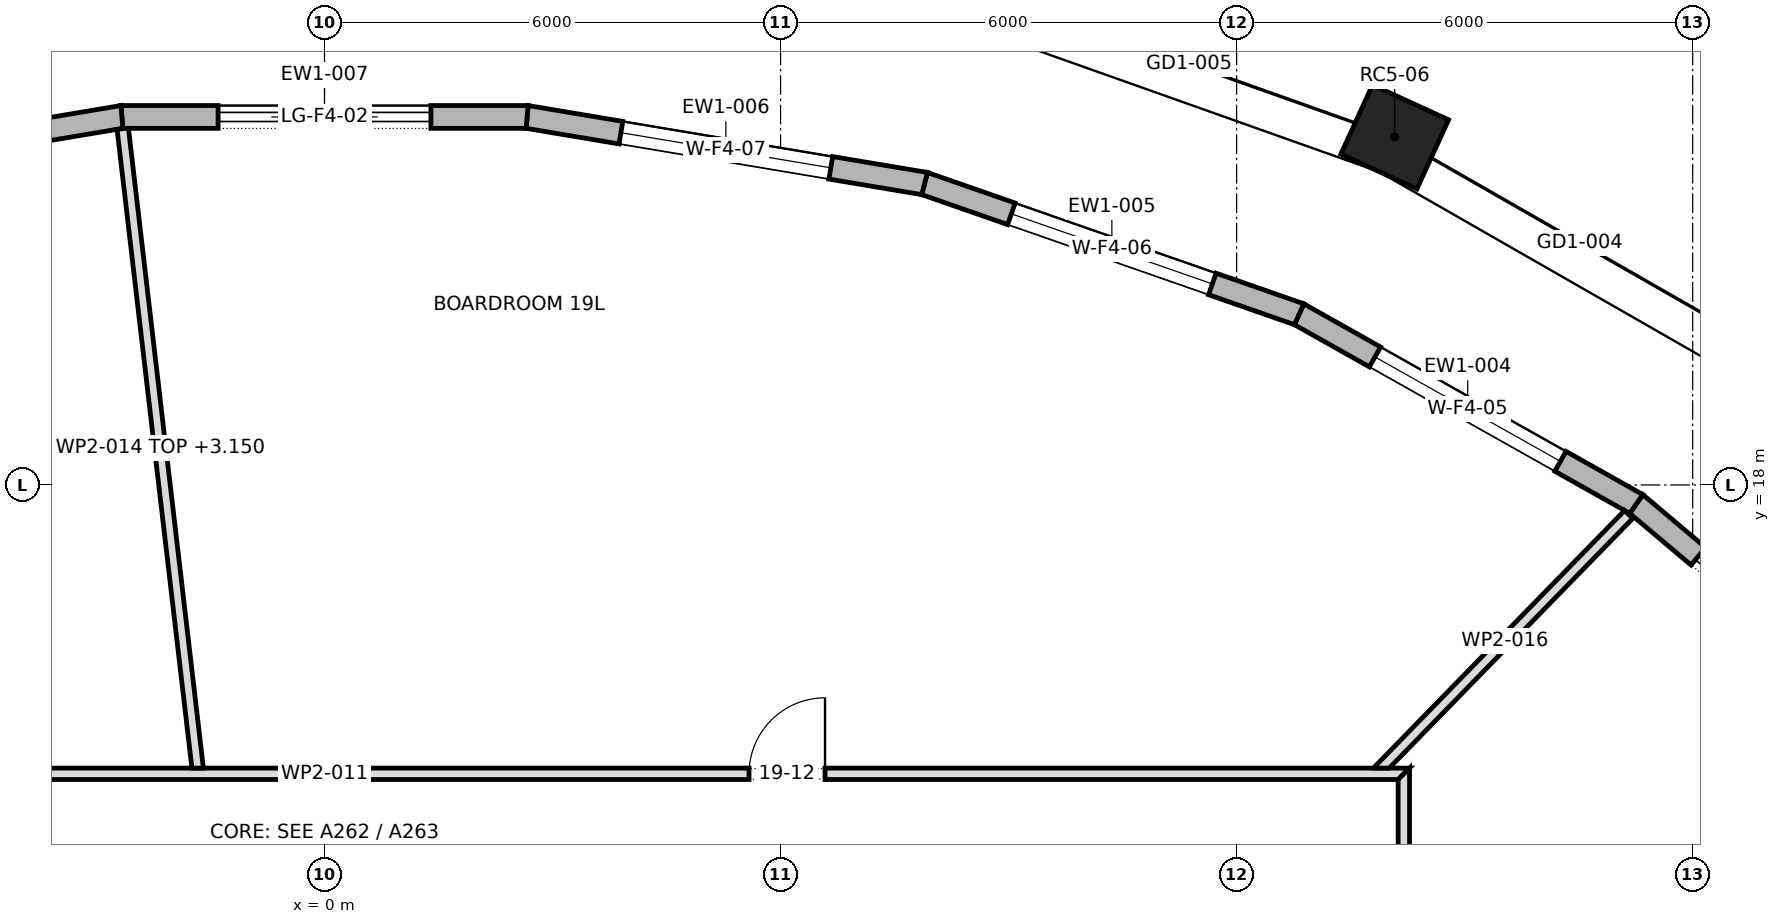
"""IFC4 building model, lengths in metres.
Left out: names, types, materials, properties, quantities, classifications, styles, units other than length and angle.
Written with IfcOpenShell. Run it as: python <this file> out.ifc"""

import sys

from ifc_helpers import new_model, si_unit, direction, frame, frame_2d, origin, origin_2d, place, context, subcontext, project, spatial, polyline, rectangle, outline, extrude, element, fill, save


model = new_model("IFC4")
c1 = context("Model", 3, precision=1e-05, world=origin(), true_north=direction((0.0, 1.0)))
c2 = subcontext(c1, "Body", "Model", "MODEL_VIEW")
j1 = project(units=[si_unit("LENGTHUNIT", "METRE"), si_unit("PLANEANGLEUNIT", "RADIAN")], contexts=[c1])
p1 = place(None, origin())
s1 = spatial("IfcSite", under=j1, at=p1, CompositionType="ELEMENT")
p2 = place(p1, origin())
s2 = spatial("IfcBuilding", under=s1, at=p2, CompositionType="ELEMENT")
p3 = place(p2, frame((0.0, 0.0, 268.3)))
s3 = spatial("IfcBuildingStorey", under=s2, at=p3, CompositionType="ELEMENT", Elevation=268.3)
p4 = place(p3, frame((14.08, 22.579, 0.0), z_axis=(0.0, 0.0, 1.0), x_axis=(-0.909127095833, 0.416518815449, 0.0)))
e1 = element("IfcColumn", 1, at=p4, inside=s3, PredefinedType="COLUMN", context=c2, shape_type="SweptSolid", body=[
    extrude(rectangle(XDim=1.1, YDim=1.0, at=origin_2d()), origin(), (0.0, 0.0, 1.0), 4.0),
])
p5 = place(p3, frame((21.032, 14.57, 0.0), z_axis=(0.0, 0.0, 1.0), x_axis=(-0.764832940795, 0.644228664897, 0.0)))
e2 = element("IfcWall", 2, at=p5, inside=s3, PredefinedType="STANDARD", context=c2, shape_type="SweptSolid", body=[
    extrude(outline(polyline([(-0.015, -0.15), (4.949, -0.15), (4.921, 0.15), (0.015, 0.15), (-0.015, -0.15)])), origin(), (0.0, 0.0, 1.0), 3.7),
])
p6 = place(p5, frame((1.068, 0.0, 0.0)))
e3 = element("IfcOpeningElement", 3, at=p6, cuts=e2, PredefinedType="OPENING", context=c2, shape_type="SweptSolid", body=[
    extrude(rectangle(XDim=2.8, YDim=3.25, at=frame_2d((1.4, 1.625))), frame((0.0, 0.162, 0.0), z_axis=(0.0, -1.0, 0.0), x_axis=(1.0, 0.0, 0.0)), (0.0, 0.0, 1.0), 0.324),
])
p7 = place(p3, frame((17.258, 17.75, 0.0), z_axis=(0.0, 0.0, 1.0), x_axis=(-0.871433320402, 0.490513983585, 0.0)))
e4 = element("IfcWall", 4, at=p7, inside=s3, PredefinedType="STANDARD", context=c2, shape_type="SweptSolid", body=[
    extrude(outline(polyline([(-0.014, -0.15), (5.104, -0.15), (5.077, 0.15), (0.014, 0.15), (-0.014, -0.15)])), origin(), (0.0, 0.0, 1.0), 3.7),
])
p8 = place(p7, frame((1.145, 0.0, 0.6)))
e5 = element("IfcOpeningElement", 5, at=p8, cuts=e4, PredefinedType="OPENING", context=c2, shape_type="SweptSolid", body=[
    extrude(rectangle(XDim=2.8, YDim=2.65, at=frame_2d((1.4, 1.325))), frame((0.0, 0.162, 0.0), z_axis=(0.0, -1.0, 0.0), x_axis=(1.0, 0.0, 0.0)), (0.0, 0.0, 1.0), 0.324),
])
p9 = place(p3, frame((12.822, 20.246, 0.0), z_axis=(0.0, 0.0, 1.0), x_axis=(-0.9441693858, 0.329460423904, 0.0)))
e6 = element("IfcWall", 6, at=p9, inside=s3, PredefinedType="STANDARD", context=c2, shape_type="SweptSolid", body=[
    extrude(outline(polyline([(-0.013, -0.15), (5.231, -0.15), (5.206, 0.15), (0.013, 0.15), (-0.013, -0.15)])), origin(), (0.0, 0.0, 1.0), 3.7),
])
p10 = place(p9, frame((1.209, 0.0, 0.6)))
e7 = element("IfcOpeningElement", 7, at=p10, cuts=e6, PredefinedType="OPENING", context=c2, shape_type="SweptSolid", body=[
    extrude(rectangle(XDim=2.8, YDim=2.65, at=frame_2d((1.4, 1.325))), frame((0.0, 0.162, 0.0), z_axis=(0.0, -1.0, 0.0), x_axis=(1.0, 0.0, 0.0)), (0.0, 0.0, 1.0), 0.324),
])
p11 = place(p3, frame((7.895, 21.966, 0.0), z_axis=(0.0, 0.0, 1.0), x_axis=(-0.986250435411, 0.165257612993, 0.0)))
e8 = element("IfcWall", 8, at=p11, inside=s3, PredefinedType="STANDARD", context=c2, shape_type="SweptSolid", body=[
    extrude(outline(polyline([(-0.013, -0.15), (5.315, -0.15), (5.29, 0.15), (0.013, 0.15), (-0.013, -0.15)])), origin(), (0.0, 0.0, 1.0), 3.7),
])
p12 = place(p11, frame((1.251, 0.0, 0.6)))
e9 = element("IfcOpeningElement", 9, at=p12, cuts=e8, PredefinedType="OPENING", context=c2, shape_type="SweptSolid", body=[
    extrude(rectangle(XDim=2.8, YDim=2.65, at=frame_2d((1.4, 1.325))), frame((0.0, 0.162, 0.0), z_axis=(0.0, -1.0, 0.0), x_axis=(1.0, 0.0, 0.0)), (0.0, 0.0, 1.0), 0.324),
])
p13 = place(p3, frame((2.666, 22.842, 0.0), z_axis=(0.0, 0.0, 1.0), x_axis=(-1.0, 0.0, 0.0)))
e10 = element("IfcWall", 10, at=p13, inside=s3, PredefinedType="STANDARD", context=c2, shape_type="SweptSolid", body=[
    extrude(outline(polyline([(-0.012, -0.15), (5.344, -0.15), (5.319, 0.15), (0.012, 0.15), (-0.012, -0.15)])), origin(), (0.0, 0.0, 1.0), 3.7),
])
p14 = place(p13, frame((1.266, 0.0, 0.0)))
e11 = element("IfcOpeningElement", 11, at=p14, cuts=e10, PredefinedType="OPENING", context=c2, shape_type="SweptSolid", body=[
    extrude(rectangle(XDim=2.8, YDim=3.25, at=frame_2d((1.4, 1.625))), frame((0.0, 0.162, 0.0), z_axis=(0.0, -1.0, 0.0), x_axis=(1.0, 0.0, 0.0)), (0.0, 0.0, 1.0), 0.324),
])
p15 = place(p3, frame((-2.666, 22.842, 0.0), z_axis=(0.0, 0.0, 1.0), x_axis=(-0.986250435411, -0.165257612993, 0.0)))
e12 = element("IfcWall", 12, at=p15, inside=s3, PredefinedType="STANDARD", context=c2, shape_type="SweptSolid", body=[
    extrude(outline(polyline([(-0.012, -0.15), (5.315, -0.15), (5.29, 0.15), (0.012, 0.15), (-0.012, -0.15)])), origin(), (0.0, 0.0, 1.0), 3.7),
])
p16 = place(p15, frame((1.251, 0.0, 0.6)))
e13 = element("IfcOpeningElement", 13, at=p16, cuts=e12, PredefinedType="OPENING", context=c2, shape_type="SweptSolid", body=[
    extrude(rectangle(XDim=2.8, YDim=2.65, at=frame_2d((1.4, 1.325))), frame((0.0, 0.162, 0.0), z_axis=(0.0, -1.0, 0.0), x_axis=(1.0, 0.0, 0.0)), (0.0, 0.0, 1.0), 0.324),
])
p17 = place(p3, frame((-14.275, 14.2, 0.0), z_axis=(0.0, 0.0, 1.0), x_axis=(1.0, 0.0, 0.0)))
e14 = element("IfcWall", 14, at=p17, inside=s3, PredefinedType="PARTITIONING", context=c2, shape_type="SweptSolid", body=[
    extrude(outline(polyline([(0.15, -0.075), (2.033, -0.075), (3.917, -0.075), (5.8, -0.075), (7.683, -0.075), (9.567, -0.075), (11.45, -0.075), (13.333, -0.075), (15.217, -0.075), (17.1, -0.075), (18.983, -0.075), (20.866, -0.075), (22.75, -0.075), (24.633, -0.075), (26.517, -0.075), (28.4, -0.075), (28.55, 0.075), (28.55, 0.075), (26.646, 0.075), (24.743, 0.075), (22.84, 0.075), (20.937, 0.075), (19.033, 0.075), (17.13, 0.075), (15.227, 0.075), (13.323, 0.075), (11.42, 0.075), (9.517, 0.075), (7.613, 0.075), (5.71, 0.075), (3.807, 0.075), (1.903, 0.075), (0.0, 0.075), (0.15, -0.075)])), origin(), (0.0, 0.0, 1.0), 3.7),
])
p18 = place(p17, frame((5.845, 0.0, 0.0)))
e15 = element("IfcOpeningElement", 15, at=p18, cuts=e14, PredefinedType="OPENING", context=c2, shape_type="SweptSolid", body=[
    extrude(rectangle(XDim=1.0, YDim=2.1, at=frame_2d((0.5, 1.05))), frame((0.0, 0.087, 0.0), z_axis=(0.0, -1.0, 0.0), x_axis=(1.0, 0.0, 0.0)), (0.0, 0.0, 1.0), 0.174),
])
p19 = place(p17, frame((19.86, 0.0, 0.0)))
e16 = element("IfcOpeningElement", 16, at=p19, cuts=e14, PredefinedType="OPENING", context=c2, shape_type="SweptSolid", body=[
    extrude(rectangle(XDim=1.0, YDim=2.1, at=frame_2d((0.5, 1.05))), frame((0.0, 0.087, 0.0), z_axis=(0.0, -1.0, 0.0), x_axis=(1.0, 0.0, 0.0)), (0.0, 0.0, 1.0), 0.174),
])
p20 = place(p3, frame((-2.655, 22.688, 0.0), z_axis=(0.0, 0.0, 1.0), x_axis=(0.116390143686, -0.993203571506, 0.0)))
e17 = element("IfcWall", 17, at=p20, inside=s3, PredefinedType="PARTITIONING", context=c2, shape_type="SweptSolid", body=[
    extrude(outline(polyline([(0.0, -0.075), (1.692, -0.075), (3.385, -0.075), (5.077, -0.075), (6.769, -0.075), (8.461, -0.075), (8.479, 0.072), (8.479, 0.075), (6.784, 0.075), (5.089, 0.075), (3.394, 0.075), (1.699, 0.075), (0.005, 0.075), (0.0, 0.036), (0.0, -0.075)])), origin(), (0.0, 0.0, 1.0), 3.15),
])
p21 = place(p3, frame((13.852, 14.223, 0.0), z_axis=(0.0, 0.0, 1.0), x_axis=(0.69820654799, 0.715896372629, 0.0)))
e18 = element("IfcWall", 18, at=p21, inside=s3, PredefinedType="PARTITIONING", context=c2, shape_type="SweptSolid", body=[
    extrude(outline(polyline([(4.734, -0.075), (4.734, 0.075), (4.734, 0.075), (3.156, 0.075), (1.578, 0.075), (0.0, 0.075), (0.0, 0.075), (0.146, -0.075), (1.675, -0.075), (3.205, -0.075), (4.734, -0.075)])), origin(), (0.0, 0.0, 1.0), 3.7),
])
p22 = place(p3, frame((14.2, -14.275, 0.0), z_axis=(0.0, 0.0, 1.0), x_axis=(0.0, 1.0, 0.0)))
e19 = element("IfcWall", 19, at=p22, inside=s3, PredefinedType="PARTITIONING", context=c2, shape_type="SweptSolid", body=[
    extrude(outline(polyline([(28.55, -0.075), (28.55, -0.075), (28.4, 0.075), (26.517, 0.075), (24.633, 0.075), (22.75, 0.075), (20.866, 0.075), (18.983, 0.075), (17.1, 0.075), (15.217, 0.075), (13.333, 0.075), (11.45, 0.075), (9.567, 0.075), (7.683, 0.075), (5.8, 0.075), (3.917, 0.075), (2.033, 0.075), (0.15, 0.075), (0.0, -0.075), (1.903, -0.075), (3.807, -0.075), (5.71, -0.075), (7.613, -0.075), (9.517, -0.075), (11.42, -0.075), (13.323, -0.075), (15.227, -0.075), (17.13, -0.075), (19.033, -0.075), (20.937, -0.075), (22.84, -0.075), (24.743, -0.075), (26.646, -0.075), (28.55, -0.075)])), origin(), (0.0, 0.0, 1.0), 3.7),
])
p23 = place(p22, frame((3.48, 0.0, 0.0)))
e20 = element("IfcOpeningElement", 20, at=p23, cuts=e19, PredefinedType="OPENING", context=c2, shape_type="SweptSolid", body=[
    extrude(rectangle(XDim=1.0, YDim=2.1, at=frame_2d((0.5, 1.05))), frame((0.0, 0.087, 0.0), z_axis=(0.0, -1.0, 0.0), x_axis=(1.0, 0.0, 0.0)), (0.0, 0.0, 1.0), 0.174),
])
p24 = place(p22, frame((9.99, 0.0, 0.0)))
e21 = element("IfcOpeningElement", 21, at=p24, cuts=e19, PredefinedType="OPENING", context=c2, shape_type="SweptSolid", body=[
    extrude(rectangle(XDim=1.0, YDim=2.1, at=frame_2d((0.5, 1.05))), frame((0.0, 0.087, 0.0), z_axis=(0.0, -1.0, 0.0), x_axis=(1.0, 0.0, 0.0)), (0.0, 0.0, 1.0), 0.174),
])
p25 = place(p22, frame((15.0, 0.0, 0.0)))
e22 = element("IfcOpeningElement", 22, at=p25, cuts=e19, PredefinedType="OPENING", context=c2, shape_type="SweptSolid", body=[
    extrude(rectangle(XDim=1.0, YDim=2.1, at=frame_2d((0.5, 1.05))), frame((0.0, 0.087, 0.0), z_axis=(0.0, -1.0, 0.0), x_axis=(1.0, 0.0, 0.0)), (0.0, 0.0, 1.0), 0.174),
])
p26 = place(p22, frame((22.69, 0.0, 0.0)))
e23 = element("IfcOpeningElement", 23, at=p26, cuts=e19, PredefinedType="OPENING", context=c2, shape_type="SweptSolid", body=[
    extrude(rectangle(XDim=1.0, YDim=2.1, at=frame_2d((0.5, 1.05))), frame((0.0, 0.087, 0.0), z_axis=(0.0, -1.0, 0.0), x_axis=(1.0, 0.0, 0.0)), (0.0, 0.0, 1.0), 0.174),
])
p27 = place(p6, origin())
e24 = element("IfcDoor", 24, at=p27, inside=s3, OperationType="DOUBLE_DOOR_SLIDING", PredefinedType="DOOR", context=c2, shape_type="SweptSolid", body=[
    extrude(rectangle(XDim=2.8, YDim=3.25, at=frame_2d((1.4, 1.625))), frame((0.0, 0.025, 0.0), z_axis=(0.0, -1.0, 0.0), x_axis=(1.0, 0.0, 0.0)), (0.0, 0.0, 1.0), 0.05),
])
fill(e3, e24)
p28 = place(p8, origin())
e25 = element("IfcWindow", 25, at=p28, inside=s3, PartitioningType="DOUBLE_PANEL_VERTICAL", PredefinedType="WINDOW", context=c2, shape_type="SweptSolid", body=[
    extrude(rectangle(XDim=2.8, YDim=2.65, at=frame_2d((1.4, 1.325))), frame((0.0, 0.03, 0.0), z_axis=(0.0, -1.0, 0.0), x_axis=(1.0, 0.0, 0.0)), (0.0, 0.0, 1.0), 0.06),
])
fill(e5, e25)
p29 = place(p10, origin())
e26 = element("IfcWindow", 26, at=p29, inside=s3, PartitioningType="DOUBLE_PANEL_VERTICAL", PredefinedType="WINDOW", context=c2, shape_type="SweptSolid", body=[
    extrude(rectangle(XDim=2.8, YDim=2.65, at=frame_2d((1.4, 1.325))), frame((0.0, 0.03, 0.0), z_axis=(0.0, -1.0, 0.0), x_axis=(1.0, 0.0, 0.0)), (0.0, 0.0, 1.0), 0.06),
])
fill(e7, e26)
p30 = place(p12, origin())
e27 = element("IfcWindow", 27, at=p30, inside=s3, PartitioningType="DOUBLE_PANEL_VERTICAL", PredefinedType="WINDOW", context=c2, shape_type="SweptSolid", body=[
    extrude(rectangle(XDim=2.8, YDim=2.65, at=frame_2d((1.4, 1.325))), frame((0.0, 0.03, 0.0), z_axis=(0.0, -1.0, 0.0), x_axis=(1.0, 0.0, 0.0)), (0.0, 0.0, 1.0), 0.06),
])
fill(e9, e27)
p31 = place(p14, origin())
e28 = element("IfcDoor", 28, at=p31, inside=s3, OperationType="DOUBLE_DOOR_SLIDING", PredefinedType="DOOR", context=c2, shape_type="SweptSolid", body=[
    extrude(rectangle(XDim=2.8, YDim=3.25, at=frame_2d((1.4, 1.625))), frame((0.0, 0.025, 0.0), z_axis=(0.0, -1.0, 0.0), x_axis=(1.0, 0.0, 0.0)), (0.0, 0.0, 1.0), 0.05),
])
fill(e11, e28)
p32 = place(p19, origin())
e29 = element("IfcDoor", 29, at=p32, inside=s3, OperationType="SINGLE_SWING_LEFT", PredefinedType="DOOR", context=c2, shape_type="SweptSolid", body=[
    extrude(rectangle(XDim=1.0, YDim=2.1, at=frame_2d((0.5, 1.05))), frame((0.0, 0.025, 0.0), z_axis=(0.0, -1.0, 0.0), x_axis=(1.0, 0.0, 0.0)), (0.0, 0.0, 1.0), 0.05),
])
fill(e16, e29)
save(model, sys.argv[1])
